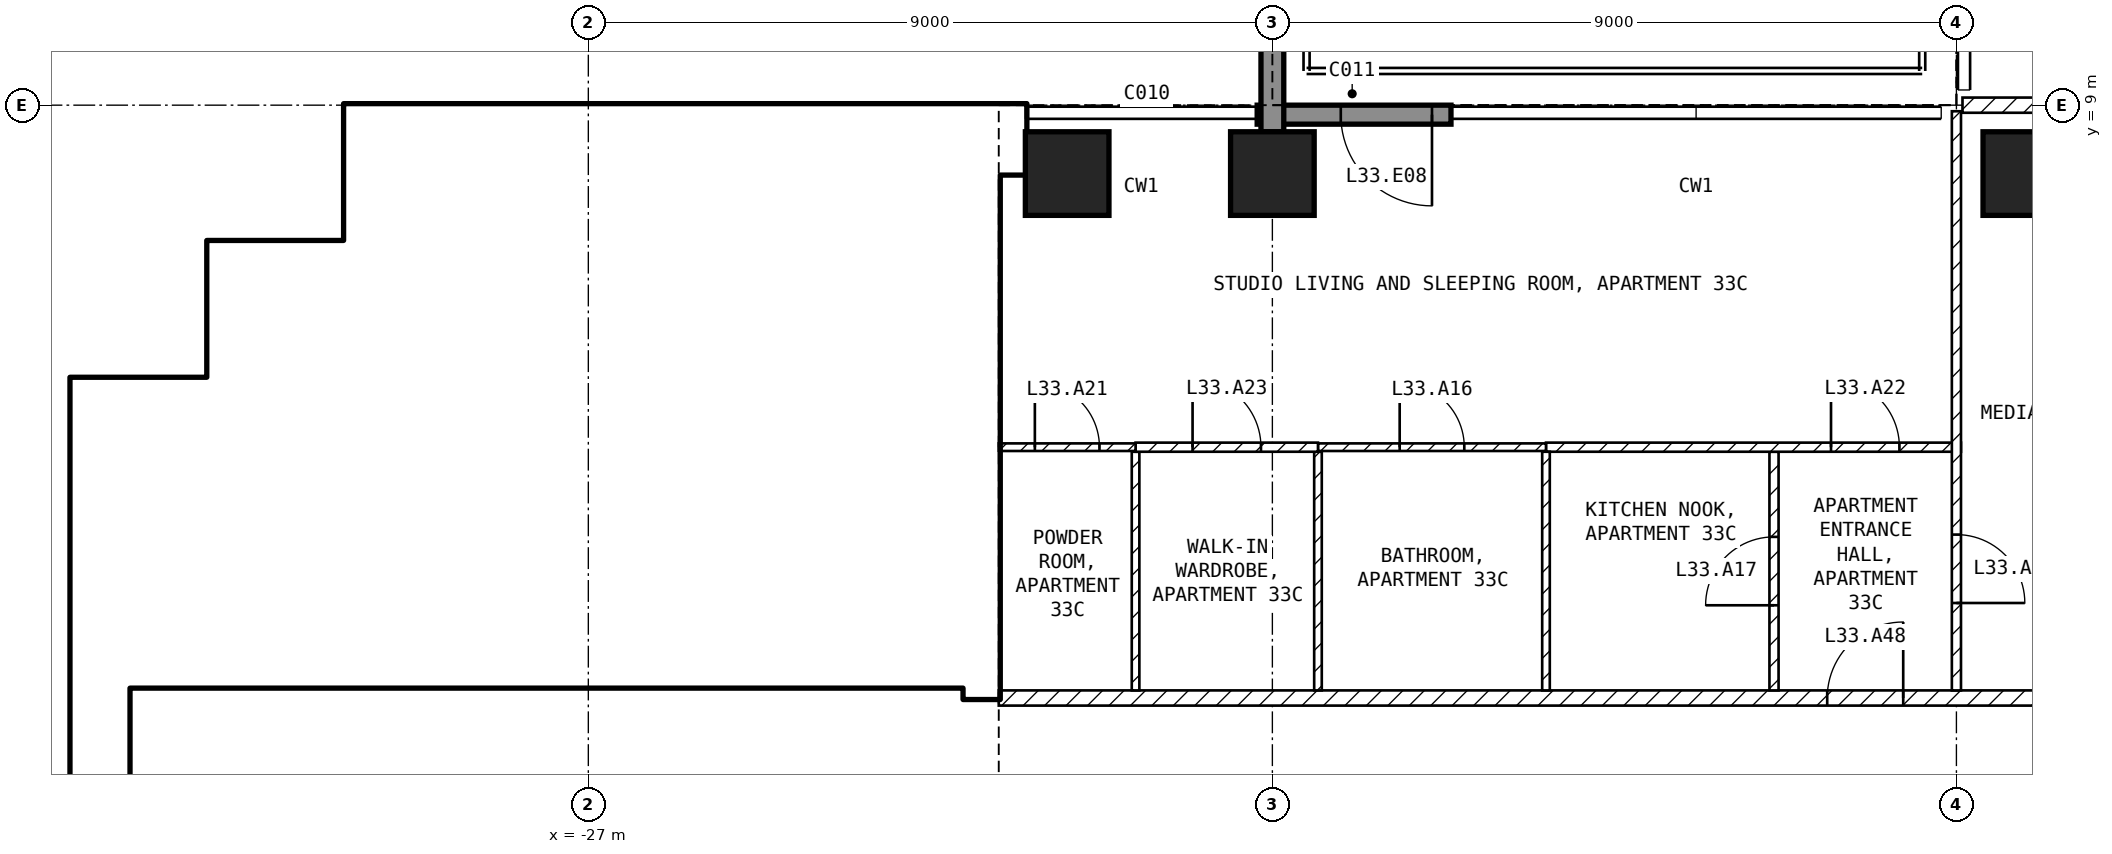
"""IFC4 building model, lengths in metres.
Left out: names, types, materials, properties, quantities, classifications, styles, units other than length and angle.
Written with IfcOpenShell. Run it as: python <this file> out.ifc"""

import sys

from ifc_helpers import new_model, si_unit, direction, frame, frame_2d, origin, origin_2d, place, context, subcontext, project, spatial, rectangle, extrude, element, fill, save


model = new_model("IFC4")
c1 = context("Model", 3, precision=1e-05, world=origin(), true_north=direction((0.0, 1.0)))
c2 = subcontext(c1, "Body", "Model", "MODEL_VIEW")
j1 = project(units=[si_unit("LENGTHUNIT", "METRE"), si_unit("PLANEANGLEUNIT", "RADIAN")], contexts=[c1])
p1 = place(None, origin())
s1 = spatial("IfcSite", under=j1, at=p1, CompositionType="ELEMENT")
p2 = place(p1, origin())
s2 = spatial("IfcBuilding", under=s1, at=p2, CompositionType="ELEMENT")
p3 = place(p2, frame((0.0, 0.0, 137.4)))
s3 = spatial("IfcBuildingStorey", under=s2, at=p3, CompositionType="ELEMENT", Elevation=137.4)
for number, where, z_axis, x_axis in (
    (1, (-20.7, 8.1, -0.25), (0.0, 0.0, 1.0), (1.0, 0.0, 0.0)),
    (2, (-18.0, 8.1, -0.25), (0.0, 0.0, 1.0), (1.0, 0.0, 0.0)),
    (3, (-8.1, 8.1, -0.25), (0.0, 0.0, 1.0), (1.0, 0.0, 0.0)),
):
    element("IfcColumn", number, at=place(p3, frame(where, z_axis=z_axis, x_axis=x_axis)), inside=s3, PredefinedType="COLUMN", context=c2, shape_type="SweptSolid", body=[
        extrude(rectangle(XDim=1.1, YDim=1.1, at=origin_2d()), origin(), (0.0, 0.0, 1.0), 3.5),
    ])
p4 = place(p3, frame((-15.65, 8.875, 0.0), z_axis=(0.0, 0.0, 1.0), x_axis=(-1.0, 0.0, 0.0)))
e4 = element("IfcWall", 4, at=p4, inside=s3, PredefinedType="SOLIDWALL", context=c2, shape_type="SweptSolid", body=[
    extrude(rectangle(XDim=2.55, YDim=0.25, at=frame_2d((1.275, 0.0))), origin(), (0.0, 0.0, 1.0), 3.25),
])
p5 = place(p4, frame((0.25, 0.0, 0.0)))
e5 = element("IfcOpeningElement", 5, at=p5, cuts=e4, PredefinedType="OPENING", context=c2, shape_type="SweptSolid", body=[
    extrude(rectangle(XDim=1.2, YDim=2.4, at=frame_2d((0.6, 1.2))), frame((0.0, 0.135, 0.0), z_axis=(0.0, -1.0, 0.0), x_axis=(1.0, 0.0, 0.0)), (0.0, 0.0, 1.0), 0.27),
])
p6 = place(p3, frame((-18.0, 8.65, 0.0), z_axis=(0.0, 0.0, 1.0), x_axis=(0.0, 1.0, 0.0)))
e6 = element("IfcWall", 6, at=p6, inside=s3, PredefinedType="SOLIDWALL", context=c2, shape_type="SweptSolid", body=[
    extrude(rectangle(XDim=3.09, YDim=0.3, at=frame_2d((1.545, 0.0))), origin(), (0.0, 0.0, 1.0), 3.25),
])
p7 = place(p3, frame((-33.425, -4.65, 0.0), z_axis=(0.0, 0.0, 1.0), x_axis=(0.0, 1.0, 0.0)))
e7 = element("IfcWall", 7, at=p7, inside=s3, PredefinedType="SHEAR", context=c2, shape_type="SweptSolid", body=[
    extrude(rectangle(XDim=10.05, YDim=0.75, at=frame_2d((5.025, 0.0))), origin(), (0.0, 0.0, 1.0), 3.25),
])
for number, where, z_axis, x_axis in (
    (8, (-33.05, 5.025, 0.0), (0.0, 0.0, 1.0), (1.0, 0.0, 0.0)),
    (9, (-31.625, 5.4, 0.0), (0.0, 0.0, 1.0), (0.0, 1.0, 0.0)),
    (10, (-31.25, 6.825, 0.0), (0.0, 0.0, 1.0), (1.0, 0.0, 0.0)),
    (11, (-29.825, 7.2, 0.0), (0.0, 0.0, 1.0), (0.0, 1.0, 0.0)),
):
    element("IfcWall", number, at=place(p3, frame(where, z_axis=z_axis, x_axis=x_axis)), inside=s3, PredefinedType="SHEAR", context=c2, shape_type="SweptSolid", body=[
        extrude(rectangle(XDim=1.8, YDim=0.75, at=frame_2d((0.9, 0.0))), origin(), (0.0, 0.0, 1.0), 3.25),
    ])
p8 = place(p3, frame((-29.45, 8.55, 0.0), z_axis=(0.0, 0.0, 1.0), x_axis=(1.0, 0.0, 0.0)))
e12 = element("IfcWall", 12, at=p8, inside=s3, PredefinedType="SHEAR", context=c2, shape_type="SweptSolid", body=[
    extrude(rectangle(XDim=8.2, YDim=0.9, at=frame_2d((4.1, 0.0))), origin(), (0.0, 0.0, 1.0), 3.25),
])
p9 = place(p3, frame((-21.825, 1.2, 0.0), z_axis=(0.0, 0.0, 1.0), x_axis=(0.0, 1.0, 0.0)))
e13 = element("IfcWall", 13, at=p9, inside=s3, PredefinedType="SHEAR", context=c2, shape_type="SweptSolid", body=[
    extrude(rectangle(XDim=6.9, YDim=0.45, at=frame_2d((3.45, 0.0))), origin(), (0.0, 0.0, 1.0), 3.25),
])
p10 = place(p3, frame((-33.05, 1.45, 0.0), z_axis=(0.0, 0.0, 1.0), x_axis=(1.0, 0.0, 0.0)))
e14 = element("IfcWall", 14, at=p10, inside=s3, PredefinedType="SOLIDWALL", context=c2, shape_type="SweptSolid", body=[
    extrude(rectangle(XDim=11.0, YDim=0.2, at=frame_2d((5.5, 0.0))), origin(), (0.0, 0.0, 1.0), 3.25),
])
p11 = place(p10, frame((9.25, 0.0, 0.0)))
e15 = element("IfcOpeningElement", 15, at=p11, cuts=e14, PredefinedType="OPENING", context=c2, shape_type="SweptSolid", body=[
    extrude(rectangle(XDim=1.0, YDim=2.1, at=frame_2d((0.5, 1.05))), frame((0.0, 0.11, 0.0), z_axis=(0.0, -1.0, 0.0), x_axis=(1.0, 0.0, 0.0)), (0.0, 0.0, 1.0), 0.22),
])
p12 = place(p10, frame((6.75, 0.0, 0.0)))
e16 = element("IfcOpeningElement", 16, at=p12, cuts=e14, PredefinedType="OPENING", context=c2, shape_type="SweptSolid", body=[
    extrude(rectangle(XDim=1.0, YDim=2.1, at=frame_2d((0.5, 1.05))), frame((0.0, 0.11, 0.0), z_axis=(0.0, -1.0, 0.0), x_axis=(1.0, 0.0, 0.0)), (0.0, 0.0, 1.0), 0.22),
])
p13 = place(p10, frame((1.025, 0.0, 0.0)))
e17 = element("IfcOpeningElement", 17, at=p13, cuts=e14, PredefinedType="OPENING", context=c2, shape_type="SweptSolid", body=[
    extrude(rectangle(XDim=0.9, YDim=2.1, at=frame_2d((0.45, 1.05))), frame((0.0, 0.11, 0.0), z_axis=(0.0, -1.0, 0.0), x_axis=(1.0, 0.0, 0.0)), (0.0, 0.0, 1.0), 0.22),
])
p14 = place(p3, frame((-28.35, 5.15, 0.0), z_axis=(0.0, 0.0, 1.0), x_axis=(1.0, 0.0, 0.0)))
e18 = element("IfcWall", 18, at=p14, inside=s3, PredefinedType="SOLIDWALL", context=c2, shape_type="SweptSolid", body=[
    extrude(rectangle(XDim=6.3, YDim=0.2, at=frame_2d((3.15, 0.0))), origin(), (0.0, 0.0, 1.0), 3.25),
])
p15 = place(p14, frame((5.1, 0.0, 0.0)))
e19 = element("IfcOpeningElement", 19, at=p15, cuts=e18, PredefinedType="OPENING", context=c2, shape_type="SweptSolid", body=[
    extrude(rectangle(XDim=1.0, YDim=2.1, at=frame_2d((0.5, 1.05))), frame((0.0, 0.11, 0.0), z_axis=(0.0, -1.0, 0.0), x_axis=(1.0, 0.0, 0.0)), (0.0, 0.0, 1.0), 0.22),
])
p16 = place(p3, frame((-28.25, 5.25, 0.0), z_axis=(0.0, 0.0, 1.0), x_axis=(0.0, 1.0, 0.0)))
e20 = element("IfcWall", 20, at=p16, inside=s3, PredefinedType="SOLIDWALL", context=c2, shape_type="SweptSolid", body=[
    extrude(rectangle(XDim=2.85, YDim=0.2, at=frame_2d((1.425, 0.0))), origin(), (0.0, 0.0, 1.0), 3.25),
])
p17 = place(p3, frame((-33.05, 3.95, 0.0), z_axis=(0.0, 0.0, 1.0), x_axis=(1.0, 0.0, 0.0)))
e21 = element("IfcWall", 21, at=p17, inside=s3, PredefinedType="SOLIDWALL", context=c2, shape_type="SweptSolid", body=[
    extrude(rectangle(XDim=5.85, YDim=0.2, at=frame_2d((2.925, 0.0))), origin(), (0.0, 0.0, 1.0), 3.25),
])
p18 = place(p3, frame((-27.1, 1.55, 0.0), z_axis=(0.0, 0.0, 1.0), x_axis=(0.0, 1.0, 0.0)))
e22 = element("IfcWall", 22, at=p18, inside=s3, PredefinedType="SOLIDWALL", context=c2, shape_type="SweptSolid", body=[
    extrude(rectangle(XDim=3.5, YDim=0.2, at=frame_2d((1.75, 0.0))), origin(), (0.0, 0.0, 1.0), 3.25),
])
p19 = place(p18, frame((0.6, 0.0, 0.0)))
e23 = element("IfcOpeningElement", 23, at=p19, cuts=e22, PredefinedType="OPENING", context=c2, shape_type="SweptSolid", body=[
    extrude(rectangle(XDim=1.1, YDim=2.1, at=frame_2d((0.55, 1.05))), frame((0.0, 0.11, 0.0), z_axis=(0.0, -1.0, 0.0), x_axis=(1.0, 0.0, 0.0)), (0.0, 0.0, 1.0), 0.22),
])
p20 = place(p18, frame((2.6, 0.0, 0.0)))
e24 = element("IfcOpeningElement", 24, at=p20, cuts=e22, PredefinedType="OPENING", context=c2, shape_type="SweptSolid", body=[
    extrude(rectangle(XDim=0.8, YDim=2.1, at=frame_2d((0.4, 1.05))), frame((0.0, 0.11, 0.0), z_axis=(0.0, -1.0, 0.0), x_axis=(1.0, 0.0, 0.0)), (0.0, 0.0, 1.0), 0.22),
])
p21 = place(p3, frame((-30.0, 1.55, 0.0), z_axis=(0.0, 0.0, 1.0), x_axis=(0.0, 1.0, 0.0)))
e25 = element("IfcWall", 25, at=p21, inside=s3, PredefinedType="SOLIDWALL", context=c2, shape_type="SweptSolid", body=[
    extrude(rectangle(XDim=2.3, YDim=0.2, at=frame_2d((1.15, 0.0))), origin(), (0.0, 0.0, 1.0), 3.25),
])
p22 = place(p3, frame((-21.6, 1.2, 0.0), z_axis=(0.0, 0.0, 1.0), x_axis=(1.0, 0.0, 0.0)))
e26 = element("IfcWall", 26, at=p22, inside=s3, PredefinedType="PARTITIONING", context=c2, shape_type="SweptSolid", body=[
    extrude(rectangle(XDim=17.2, YDim=0.2, at=frame_2d((8.6, 0.0))), origin(), (0.0, 0.0, 1.0), 3.25),
])
p23 = place(p22, frame((10.9, 0.0, 0.0)))
e27 = element("IfcOpeningElement", 27, at=p23, cuts=e26, PredefinedType="OPENING", context=c2, shape_type="SweptSolid", body=[
    extrude(rectangle(XDim=1.0, YDim=2.1, at=frame_2d((0.5, 1.05))), frame((0.0, 0.11, 0.0), z_axis=(0.0, -1.0, 0.0), x_axis=(1.0, 0.0, 0.0)), (0.0, 0.0, 1.0), 0.22),
])
p24 = place(p3, frame((-8.92, 9.0, 0.0), z_axis=(0.0, 0.0, 1.0), x_axis=(1.0, 0.0, 0.0)))
e28 = element("IfcWall", 28, at=p24, inside=s3, PredefinedType="PARTITIONING", context=c2, shape_type="SweptSolid", body=[
    extrude(rectangle(XDim=17.84, YDim=0.2, at=frame_2d((8.92, 0.0))), origin(), (0.0, 0.0, 1.0), 3.25),
])
p25 = place(p24, frame((8.42, 0.0, 0.0)))
e29 = element("IfcOpeningElement", 29, at=p25, cuts=e28, PredefinedType="OPENING", context=c2, shape_type="SweptSolid", body=[
    extrude(rectangle(XDim=1.0, YDim=2.1, at=frame_2d((0.5, 1.05))), frame((0.0, 0.11, 0.0), z_axis=(0.0, -1.0, 0.0), x_axis=(1.0, 0.0, 0.0)), (0.0, 0.0, 1.0), 0.22),
])
p26 = place(p3, frame((-11.4, 1.3, 0.0), z_axis=(0.0, 0.0, 1.0), x_axis=(0.0, 1.0, 0.0)))
e30 = element("IfcWall", 30, at=p26, inside=s3, PredefinedType="PARTITIONING", context=c2, shape_type="SweptSolid", body=[
    extrude(rectangle(XDim=3.14, YDim=0.12, at=frame_2d((1.57, 0.0))), origin(), (0.0, 0.0, 1.0), 3.25),
])
p27 = place(p26, frame((1.12, 0.0, 0.0)))
e31 = element("IfcOpeningElement", 31, at=p27, cuts=e30, PredefinedType="OPENING", context=c2, shape_type="SweptSolid", body=[
    extrude(rectangle(XDim=0.9, YDim=2.1, at=frame_2d((0.45, 1.05))), frame((0.0, 0.07, 0.0), z_axis=(0.0, -1.0, 0.0), x_axis=(1.0, 0.0, 0.0)), (0.0, 0.0, 1.0), 0.14),
])
p28 = place(p3, frame((-14.4, 4.5, 0.0), z_axis=(0.0, 0.0, 1.0), x_axis=(1.0, 0.0, 0.0)))
e32 = element("IfcWall", 32, at=p28, inside=s3, PredefinedType="PARTITIONING", context=c2, shape_type="SweptSolid", body=[
    extrude(rectangle(XDim=5.46, YDim=0.12, at=frame_2d((2.73, 0.0))), origin(), (0.0, 0.0, 1.0), 3.25),
])
p29 = place(p28, frame((3.75, 0.0, 0.0)))
e33 = element("IfcOpeningElement", 33, at=p29, cuts=e32, PredefinedType="OPENING", context=c2, shape_type="SweptSolid", body=[
    extrude(rectangle(XDim=0.9, YDim=2.1, at=frame_2d((0.45, 1.05))), frame((0.0, 0.07, 0.0), z_axis=(0.0, -1.0, 0.0), x_axis=(1.0, 0.0, 0.0)), (0.0, 0.0, 1.0), 0.14),
])
p30 = place(p3, frame((-9.0, 8.92, 0.0), z_axis=(0.0, 0.0, 1.0), x_axis=(0.0, -1.0, 0.0)))
e34 = element("IfcWall", 34, at=p30, inside=s3, PredefinedType="PARTITIONING", context=c2, shape_type="SweptSolid", body=[
    extrude(rectangle(XDim=7.62, YDim=0.12, at=frame_2d((3.81, 0.0))), origin(), (0.0, 0.0, 1.0), 3.25),
])
p31 = place(p30, frame((5.57, 0.0, 0.0)))
e35 = element("IfcOpeningElement", 35, at=p31, cuts=e34, PredefinedType="OPENING", context=c2, shape_type="SweptSolid", body=[
    extrude(rectangle(XDim=0.9, YDim=2.1, at=frame_2d((0.45, 1.05))), frame((0.0, 0.07, 0.0), z_axis=(0.0, -1.0, 0.0), x_axis=(1.0, 0.0, 0.0)), (0.0, 0.0, 1.0), 0.14),
])
for number, where, z_axis, x_axis in (
    (36, (-14.4, 1.3, 0.0), (0.0, 0.0, 1.0), (0.0, 1.0, 0.0)),
    (37, (-17.4, 1.3, 0.0), (0.0, 0.0, 1.0), (0.0, 1.0, 0.0)),
):
    element("IfcWall", number, at=place(p3, frame(where, z_axis=z_axis, x_axis=x_axis)), inside=s3, PredefinedType="PARTITIONING", context=c2, shape_type="SweptSolid", body=[
        extrude(rectangle(XDim=3.14, YDim=0.1, at=frame_2d((1.57, 0.0))), origin(), (0.0, 0.0, 1.0), 3.25),
    ])
p32 = place(p3, frame((-17.4, 4.5, 0.0), z_axis=(0.0, 0.0, 1.0), x_axis=(1.0, 0.0, 0.0)))
e38 = element("IfcWall", 38, at=p32, inside=s3, PredefinedType="PARTITIONING", context=c2, shape_type="SweptSolid", body=[
    extrude(rectangle(XDim=3.0, YDim=0.1, at=frame_2d((1.5, 0.0))), origin(), (0.0, 0.0, 1.0), 3.25),
])
p33 = place(p32, frame((1.075, 0.0, 0.0)))
e39 = element("IfcOpeningElement", 39, at=p33, cuts=e38, PredefinedType="OPENING", context=c2, shape_type="SweptSolid", body=[
    extrude(rectangle(XDim=0.85, YDim=2.1, at=frame_2d((0.425, 1.05))), frame((0.0, 0.06, 0.0), z_axis=(0.0, -1.0, 0.0), x_axis=(1.0, 0.0, 0.0)), (0.0, 0.0, 1.0), 0.12),
])
p34 = place(p3, frame((-19.8, 1.3, 0.0), z_axis=(0.0, 0.0, 1.0), x_axis=(0.0, 1.0, 0.0)))
e40 = element("IfcWall", 40, at=p34, inside=s3, PredefinedType="PARTITIONING", context=c2, shape_type="SweptSolid", body=[
    extrude(rectangle(XDim=3.14, YDim=0.1, at=frame_2d((1.57, 0.0))), origin(), (0.0, 0.0, 1.0), 3.25),
])
p35 = place(p3, frame((-19.8, 4.5, 0.0), z_axis=(0.0, 0.0, 1.0), x_axis=(1.0, 0.0, 0.0)))
e41 = element("IfcWall", 41, at=p35, inside=s3, PredefinedType="PARTITIONING", context=c2, shape_type="SweptSolid", body=[
    extrude(rectangle(XDim=2.4, YDim=0.12, at=frame_2d((1.2, 0.0))), origin(), (0.0, 0.0, 1.0), 3.25),
])
p36 = place(p35, frame((0.75, 0.0, 0.0)))
e42 = element("IfcOpeningElement", 42, at=p36, cuts=e41, PredefinedType="OPENING", context=c2, shape_type="SweptSolid", body=[
    extrude(rectangle(XDim=0.9, YDim=2.1, at=frame_2d((0.45, 1.05))), frame((0.0, 0.07, 0.0), z_axis=(0.0, -1.0, 0.0), x_axis=(1.0, 0.0, 0.0)), (0.0, 0.0, 1.0), 0.14),
])
p37 = place(p3, frame((-21.6, 4.5, 0.0), z_axis=(0.0, 0.0, 1.0), x_axis=(1.0, 0.0, 0.0)))
e43 = element("IfcWall", 43, at=p37, inside=s3, PredefinedType="PARTITIONING", context=c2, shape_type="SweptSolid", body=[
    extrude(rectangle(XDim=1.8, YDim=0.1, at=frame_2d((0.9, 0.0))), origin(), (0.0, 0.0, 1.0), 3.25),
])
p38 = place(p37, frame((0.475, 0.0, 0.0)))
e44 = element("IfcOpeningElement", 44, at=p38, cuts=e43, PredefinedType="OPENING", context=c2, shape_type="SweptSolid", body=[
    extrude(rectangle(XDim=0.85, YDim=2.1, at=frame_2d((0.425, 1.05))), frame((0.0, 0.06, 0.0), z_axis=(0.0, -1.0, 0.0), x_axis=(1.0, 0.0, 0.0)), (0.0, 0.0, 1.0), 0.12),
])
p39 = place(p5, origin())
e45 = element("IfcDoor", 45, at=p39, inside=s3, OperationType="SINGLE_SWING_LEFT", PredefinedType="DOOR", context=c2, shape_type="SweptSolid", body=[
    extrude(rectangle(XDim=1.2, YDim=2.4, at=frame_2d((0.6, 1.2))), frame((0.0, 0.025, 0.0), z_axis=(0.0, -1.0, 0.0), x_axis=(1.0, 0.0, 0.0)), (0.0, 0.0, 1.0), 0.05),
])
fill(e5, e45)
p40 = place(p19, origin())
e46 = element("IfcDoor", 46, at=p40, inside=s3, OperationType="DOUBLE_DOOR_SLIDING", PredefinedType="DOOR", context=c2, shape_type="SweptSolid", body=[
    extrude(rectangle(XDim=1.1, YDim=2.1, at=frame_2d((0.55, 1.05))), frame((0.0, 0.025, 0.0), z_axis=(0.0, -1.0, 0.0), x_axis=(1.0, 0.0, 0.0)), (0.0, 0.0, 1.0), 0.05),
])
fill(e23, e46)
p41 = place(p15, origin())
e47 = element("IfcDoor", 47, at=p41, inside=s3, OperationType="SINGLE_SWING_LEFT", PredefinedType="DOOR", context=c2, shape_type="SweptSolid", body=[
    extrude(rectangle(XDim=1.0, YDim=2.1, at=frame_2d((0.5, 1.05))), frame((0.0, 0.025, 0.0), z_axis=(0.0, -1.0, 0.0), x_axis=(1.0, 0.0, 0.0)), (0.0, 0.0, 1.0), 0.05),
])
fill(e19, e47)
p42 = place(p11, origin())
e48 = element("IfcDoor", 48, at=p42, inside=s3, OperationType="SINGLE_SWING_LEFT", PredefinedType="DOOR", context=c2, shape_type="SweptSolid", body=[
    extrude(rectangle(XDim=1.0, YDim=2.1, at=frame_2d((0.5, 1.05))), frame((0.0, 0.025, 0.0), z_axis=(0.0, -1.0, 0.0), x_axis=(1.0, 0.0, 0.0)), (0.0, 0.0, 1.0), 0.05),
])
fill(e15, e48)
p43 = place(p12, origin())
e49 = element("IfcDoor", 49, at=p43, inside=s3, OperationType="SINGLE_SWING_LEFT", PredefinedType="DOOR", context=c2, shape_type="SweptSolid", body=[
    extrude(rectangle(XDim=1.0, YDim=2.1, at=frame_2d((0.5, 1.05))), frame((0.0, 0.025, 0.0), z_axis=(0.0, -1.0, 0.0), x_axis=(1.0, 0.0, 0.0)), (0.0, 0.0, 1.0), 0.05),
])
fill(e16, e49)
p44 = place(p20, origin())
e50 = element("IfcDoor", 50, at=p44, inside=s3, OperationType="SINGLE_SWING_LEFT", PredefinedType="DOOR", context=c2, shape_type="SweptSolid", body=[
    extrude(rectangle(XDim=0.8, YDim=2.1, at=frame_2d((0.4, 1.05))), frame((0.0, 0.025, 0.0), z_axis=(0.0, -1.0, 0.0), x_axis=(1.0, 0.0, 0.0)), (0.0, 0.0, 1.0), 0.05),
])
fill(e24, e50)
p45 = place(p13, origin())
e51 = element("IfcDoor", 51, at=p45, inside=s3, OperationType="SINGLE_SWING_LEFT", PredefinedType="DOOR", context=c2, shape_type="SweptSolid", body=[
    extrude(rectangle(XDim=0.9, YDim=2.1, at=frame_2d((0.45, 1.05))), frame((0.0, 0.025, 0.0), z_axis=(0.0, -1.0, 0.0), x_axis=(1.0, 0.0, 0.0)), (0.0, 0.0, 1.0), 0.05),
])
fill(e17, e51)
p46 = place(p33, origin())
e52 = element("IfcDoor", 52, at=p46, inside=s3, OperationType="SINGLE_SWING_LEFT", PredefinedType="DOOR", context=c2, shape_type="SweptSolid", body=[
    extrude(rectangle(XDim=0.85, YDim=2.1, at=frame_2d((0.425, 1.05))), frame((0.0, 0.025, 0.0), z_axis=(0.0, -1.0, 0.0), x_axis=(1.0, 0.0, 0.0)), (0.0, 0.0, 1.0), 0.05),
])
fill(e39, e52)
p47 = place(p27, origin())
e53 = element("IfcDoor", 53, at=p47, inside=s3, OperationType="SINGLE_SWING_LEFT", PredefinedType="DOOR", context=c2, shape_type="SweptSolid", body=[
    extrude(rectangle(XDim=0.9, YDim=2.1, at=frame_2d((0.45, 1.05))), frame((0.0, 0.025, 0.0), z_axis=(0.0, -1.0, 0.0), x_axis=(1.0, 0.0, 0.0)), (0.0, 0.0, 1.0), 0.05),
])
fill(e31, e53)
p48 = place(p31, origin())
e54 = element("IfcDoor", 54, at=p48, inside=s3, OperationType="SINGLE_SWING_RIGHT", PredefinedType="DOOR", context=c2, shape_type="SweptSolid", body=[
    extrude(rectangle(XDim=0.9, YDim=2.1, at=frame_2d((0.45, 1.05))), frame((0.0, 0.025, 0.0), z_axis=(0.0, -1.0, 0.0), x_axis=(1.0, 0.0, 0.0)), (0.0, 0.0, 1.0), 0.05),
])
fill(e35, e54)
p49 = place(p38, origin())
e55 = element("IfcDoor", 55, at=p49, inside=s3, OperationType="SINGLE_SWING_LEFT", PredefinedType="DOOR", context=c2, shape_type="SweptSolid", body=[
    extrude(rectangle(XDim=0.85, YDim=2.1, at=frame_2d((0.425, 1.05))), frame((0.0, 0.025, 0.0), z_axis=(0.0, -1.0, 0.0), x_axis=(1.0, 0.0, 0.0)), (0.0, 0.0, 1.0), 0.05),
])
fill(e44, e55)
p50 = place(p29, origin())
e56 = element("IfcDoor", 56, at=p50, inside=s3, OperationType="SINGLE_SWING_LEFT", PredefinedType="DOOR", context=c2, shape_type="SweptSolid", body=[
    extrude(rectangle(XDim=0.9, YDim=2.1, at=frame_2d((0.45, 1.05))), frame((0.0, 0.025, 0.0), z_axis=(0.0, -1.0, 0.0), x_axis=(1.0, 0.0, 0.0)), (0.0, 0.0, 1.0), 0.05),
])
fill(e33, e56)
p51 = place(p36, origin())
e57 = element("IfcDoor", 57, at=p51, inside=s3, OperationType="SINGLE_SWING_LEFT", PredefinedType="DOOR", context=c2, shape_type="SweptSolid", body=[
    extrude(rectangle(XDim=0.9, YDim=2.1, at=frame_2d((0.45, 1.05))), frame((0.0, 0.025, 0.0), z_axis=(0.0, -1.0, 0.0), x_axis=(1.0, 0.0, 0.0)), (0.0, 0.0, 1.0), 0.05),
])
fill(e42, e57)
p52 = place(p23, origin())
e58 = element("IfcDoor", 58, at=p52, inside=s3, OperationType="SINGLE_SWING_RIGHT", PredefinedType="DOOR", context=c2, shape_type="SweptSolid", body=[
    extrude(rectangle(XDim=1.0, YDim=2.1, at=frame_2d((0.5, 1.05))), frame((0.0, 0.025, 0.0), z_axis=(0.0, -1.0, 0.0), x_axis=(1.0, 0.0, 0.0)), (0.0, 0.0, 1.0), 0.05),
])
fill(e27, e58)
save(model, sys.argv[1])
